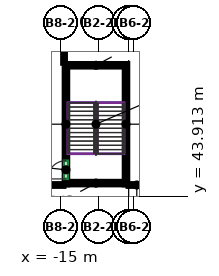
"""IFC4 building model, lengths in metres.
Left out: names, types, materials, properties, quantities, classifications, styles, units other than length and angle.
Written with IfcOpenShell. Run it as: python <this file> out.ifc"""

import sys

from ifc_helpers import new_model, si_unit, direction, frame, frame_2d, origin, place, context, subcontext, project, spatial, rectangle, extrude, source, transform, mapped, element, fill, save


model = new_model("IFC4")
c1 = context("Model", 3, precision=1e-05, world=origin(), true_north=direction((0.0, 1.0)))
c2 = subcontext(c1, "Body", "Model", "MODEL_VIEW")
j1 = project(units=[si_unit("LENGTHUNIT", "METRE"), si_unit("PLANEANGLEUNIT", "RADIAN")], contexts=[c1])
p1 = place(None, origin())
s1 = spatial("IfcSite", under=j1, at=p1, CompositionType="ELEMENT")
p2 = place(p1, origin())
s2 = spatial("IfcBuilding", under=s1, at=p2, CompositionType="ELEMENT")
p3 = place(p2, origin())
s3 = spatial("IfcBuildingStorey", under=s2, at=p3, CompositionType="ELEMENT", Elevation=0.0)
m1 = source(origin(), c2, "Body", "SweptSolid", [
    extrude(rectangle(XDim=8.0, YDim=0.25, at=frame_2d((4.0, 0.0))), origin(), (0.0, 0.0, 1.0), 8.6),
])
p4 = place(p3, frame((-14.625, 44.65, 0.0), z_axis=(0.0, 0.0, 1.0), x_axis=(0.0, 1.0, 0.0)))
e1 = element("IfcWall", 1, at=p4, inside=s3, PredefinedType="SHEAR", context=c2, shape_type="MappedRepresentation", body=[
    mapped(m1, transform((0.0, 0.0, 0.0))),
])
p5 = place(p4, frame((0.4, 0.0, 0.0)))
e2 = element("IfcOpeningElement", 2, at=p5, cuts=e1, PredefinedType="OPENING", context=c2, shape_type="SweptSolid", body=[
    extrude(rectangle(XDim=1.2, YDim=2.1, at=frame_2d((0.6, 1.05))), frame((0.0, 0.135, 0.0), z_axis=(0.0, -1.0, 0.0), x_axis=(1.0, 0.0, 0.0)), (0.0, 0.0, 1.0), 0.27),
])
p6 = place(p3, frame((-10.675, 44.65, 0.0), z_axis=(0.0, 0.0, 1.0), x_axis=(0.0, 1.0, 0.0)))
e3 = element("IfcWall", 3, at=p6, inside=s3, PredefinedType="SHEAR", context=c2, shape_type="MappedRepresentation", body=[
    mapped(m1, transform((0.0, 0.0, 0.0))),
])
m2 = source(origin(), c2, "Body", "SweptSolid", [
    extrude(rectangle(XDim=3.7, YDim=0.25, at=frame_2d((1.85, 0.0))), origin(), (0.0, 0.0, 1.0), 8.6),
])
for number, where, z_axis, x_axis in (
    (4, (-14.5, 44.775, 0.0), (0.0, 0.0, 1.0), (1.0, 0.0, 0.0)),
    (5, (-14.5, 52.525, 0.0), (0.0, 0.0, 1.0), (1.0, 0.0, 0.0)),
):
    element("IfcWall", number, at=place(p3, frame(where, z_axis=z_axis, x_axis=x_axis)), inside=s3, PredefinedType="SHEAR", context=c2, shape_type="MappedRepresentation", body=[
        mapped(m2, transform((0.0, 0.0, 0.0))),
    ])
m3 = source(origin(), c2, "Body", "SweptSolid", [
    extrude(rectangle(XDim=3.8, YDim=0.2, at=frame_2d((1.9, 0.0))), origin(), (0.0, 0.0, 1.0), 7.7),
])
p7 = place(p3, frame((-18.55, 44.65, 0.0), z_axis=(0.0, 0.0, 1.0), x_axis=(1.0, 0.0, 0.0)))
e6 = element("IfcWall", 6, at=p7, inside=s3, PredefinedType="PARTITIONING", context=c2, shape_type="MappedRepresentation", body=[
    mapped(m3, transform((0.0, 0.0, 0.0))),
])
m4 = source(origin(), c2, "Body", "SweptSolid", [
    extrude(rectangle(XDim=4.2, YDim=0.2, at=frame_2d((2.1, 0.0))), origin(), (0.0, 0.0, 1.0), 7.7),
])
p8 = place(p3, frame((-14.75, 52.65, 0.0), z_axis=(0.0, 0.0, 1.0), x_axis=(0.0, 1.0, 0.0)))
e7 = element("IfcWall", 7, at=p8, inside=s3, PredefinedType="PARTITIONING", context=c2, shape_type="MappedRepresentation", body=[
    mapped(m4, transform((0.0, 0.0, 0.0))),
])
m5 = source(origin(), c2, "Body", "SweptSolid", [
    extrude(rectangle(XDim=3.9, YDim=0.2, at=frame_2d((1.95, 0.0))), origin(), (0.0, 0.0, 1.0), 7.7),
])
p9 = place(p3, frame((-10.55, 44.65, 0.0), z_axis=(0.0, 0.0, 1.0), x_axis=(1.0, 0.0, 0.0)))
e8 = element("IfcWall", 8, at=p9, inside=s3, PredefinedType="PARTITIONING", context=c2, shape_type="MappedRepresentation", body=[
    mapped(m5, transform((0.0, 0.0, 0.0))),
])
p10 = place(p9, frame((1.35, 0.0, 0.0)))
e9 = element("IfcOpeningElement", 9, at=p10, cuts=e8, PredefinedType="OPENING", context=c2, shape_type="SweptSolid", body=[
    extrude(rectangle(XDim=1.2, YDim=2.1, at=frame_2d((0.6, 1.05))), frame((0.0, 0.11, 0.0), z_axis=(0.0, -1.0, 0.0), x_axis=(1.0, 0.0, 0.0)), (0.0, 0.0, 1.0), 0.22),
])
p11 = place(p5, origin())
e10 = element("IfcDoor", 10, at=p11, inside=s3, OperationType="DOUBLE_DOOR_SINGLE_SWING", PredefinedType="DOOR", context=c2, shape_type="SweptSolid", body=[
    extrude(rectangle(XDim=1.2, YDim=2.1, at=frame_2d((0.6, 1.05))), frame((0.0, 0.025, 0.0), z_axis=(0.0, -1.0, 0.0), x_axis=(1.0, 0.0, 0.0)), (0.0, 0.0, 1.0), 0.05),
])
fill(e2, e10)
save(model, sys.argv[1])
